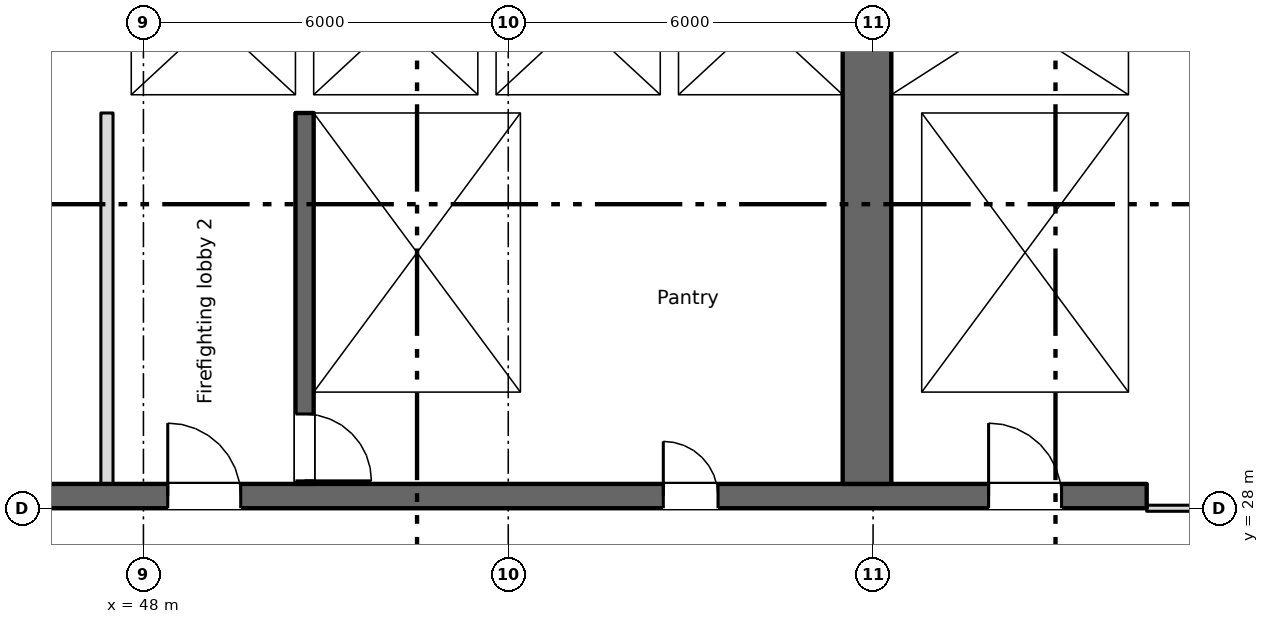
"""IFC4 building model, lengths in metres.
Left out: names, types, materials, properties, quantities, classifications, styles, units other than length and angle.
Written with IfcOpenShell. Run it as: python <this file> out.ifc"""

import sys

from ifc_helpers import new_model, si_unit, direction, frame, frame_2d, origin, place, context, subcontext, project, spatial, rectangle, extrude, element, fill, save


model = new_model("IFC4")
c1 = context("Model", 3, precision=1e-05, world=origin(), true_north=direction((0.0, 1.0)))
c2 = subcontext(c1, "Body", "Model", "MODEL_VIEW")
j1 = project(units=[si_unit("LENGTHUNIT", "METRE"), si_unit("PLANEANGLEUNIT", "RADIAN")], contexts=[c1])
p1 = place(None, origin())
s1 = spatial("IfcSite", under=j1, at=p1, CompositionType="ELEMENT")
p2 = place(p1, origin())
s2 = spatial("IfcBuilding", under=s1, at=p2, CompositionType="ELEMENT")
p3 = place(p2, frame((0.0, 0.0, 110.0)))
s3 = spatial("IfcBuildingStorey", under=s2, at=p3, CompositionType="ELEMENT", Elevation=110.0)
p4 = place(p3, frame((6.7, 28.2, 0.0), z_axis=(0.0, 0.0, 1.0), x_axis=(1.0, 0.0, 0.0)))
e1 = element("IfcWall", 1, at=p4, inside=s3, PredefinedType="SHEAR", context=c2, shape_type="SweptSolid", body=[
    extrude(rectangle(XDim=57.8, YDim=0.4, at=frame_2d((28.9, 0.0))), origin(), (0.0, 0.0, 1.0), 3.35),
])
p5 = place(p4, frame((12.562, 0.0, 0.0)))
e2 = element("IfcOpeningElement", 2, at=p5, cuts=e1, PredefinedType="OPENING", context=c2, shape_type="SweptSolid", body=[
    extrude(rectangle(XDim=0.9, YDim=2.1, at=frame_2d((0.45, 1.05))), frame((0.0, 0.21, 0.0), z_axis=(0.0, -1.0, 0.0), x_axis=(1.0, 0.0, 0.0)), (0.0, 0.0, 1.0), 0.42),
])
p6 = place(p4, frame((15.137, 0.0, 0.0)))
e3 = element("IfcOpeningElement", 3, at=p6, cuts=e1, PredefinedType="OPENING", context=c2, shape_type="SweptSolid", body=[
    extrude(rectangle(XDim=0.9, YDim=2.1, at=frame_2d((0.45, 1.05))), frame((0.0, 0.21, 0.0), z_axis=(0.0, -1.0, 0.0), x_axis=(1.0, 0.0, 0.0)), (0.0, 0.0, 1.0), 0.42),
])
p7 = place(p4, frame((49.85, 0.0, 0.0)))
e4 = element("IfcOpeningElement", 4, at=p7, cuts=e1, PredefinedType="OPENING", context=c2, shape_type="SweptSolid", body=[
    extrude(rectangle(XDim=0.9, YDim=2.1, at=frame_2d((0.45, 1.05))), frame((0.0, 0.21, 0.0), z_axis=(0.0, -1.0, 0.0), x_axis=(1.0, 0.0, 0.0)), (0.0, 0.0, 1.0), 0.42),
])
p8 = place(p4, frame((0.562, 0.0, 0.0)))
e5 = element("IfcOpeningElement", 5, at=p8, cuts=e1, PredefinedType="OPENING", context=c2, shape_type="SweptSolid", body=[
    extrude(rectangle(XDim=0.9, YDim=2.1, at=frame_2d((0.45, 1.05))), frame((0.0, 0.21, 0.0), z_axis=(0.0, -1.0, 0.0), x_axis=(1.0, 0.0, 0.0)), (0.0, 0.0, 1.0), 0.42),
])
p9 = place(p4, frame((2.137, 0.0, 0.0)))
e6 = element("IfcOpeningElement", 6, at=p9, cuts=e1, PredefinedType="OPENING", context=c2, shape_type="SweptSolid", body=[
    extrude(rectangle(XDim=0.9, YDim=2.1, at=frame_2d((0.45, 1.05))), frame((0.0, 0.21, 0.0), z_axis=(0.0, -1.0, 0.0), x_axis=(1.0, 0.0, 0.0)), (0.0, 0.0, 1.0), 0.42),
])
p10 = place(p4, frame((4.7, 0.0, 0.0)))
e7 = element("IfcOpeningElement", 7, at=p10, cuts=e1, PredefinedType="OPENING", context=c2, shape_type="SweptSolid", body=[
    extrude(rectangle(XDim=1.2, YDim=2.1, at=frame_2d((0.6, 1.05))), frame((0.0, 0.21, 0.0), z_axis=(0.0, -1.0, 0.0), x_axis=(1.0, 0.0, 0.0)), (0.0, 0.0, 1.0), 0.42),
])
p11 = place(p4, frame((31.7, 0.0, 0.0)))
e8 = element("IfcOpeningElement", 8, at=p11, cuts=e1, PredefinedType="OPENING", context=c2, shape_type="SweptSolid", body=[
    extrude(rectangle(XDim=1.2, YDim=2.1, at=frame_2d((0.6, 1.05))), frame((0.0, 0.21, 0.0), z_axis=(0.0, -1.0, 0.0), x_axis=(1.0, 0.0, 0.0)), (0.0, 0.0, 1.0), 0.42),
])
p12 = place(p4, frame((55.2, 0.0, 0.0)))
e9 = element("IfcOpeningElement", 9, at=p12, cuts=e1, PredefinedType="OPENING", context=c2, shape_type="SweptSolid", body=[
    extrude(rectangle(XDim=1.2, YDim=2.1, at=frame_2d((0.6, 1.05))), frame((0.0, 0.21, 0.0), z_axis=(0.0, -1.0, 0.0), x_axis=(1.0, 0.0, 0.0)), (0.0, 0.0, 1.0), 0.42),
])
p13 = place(p4, frame((21.7, 0.0, 0.0)))
e10 = element("IfcOpeningElement", 10, at=p13, cuts=e1, PredefinedType="OPENING", context=c2, shape_type="SweptSolid", body=[
    extrude(rectangle(XDim=1.2, YDim=2.1, at=frame_2d((0.6, 1.05))), frame((0.0, 0.21, 0.0), z_axis=(0.0, -1.0, 0.0), x_axis=(1.0, 0.0, 0.0)), (0.0, 0.0, 1.0), 0.42),
])
p14 = place(p4, frame((41.7, 0.0, 0.0)))
e11 = element("IfcOpeningElement", 11, at=p14, cuts=e1, PredefinedType="OPENING", context=c2, shape_type="SweptSolid", body=[
    extrude(rectangle(XDim=1.2, YDim=2.1, at=frame_2d((0.6, 1.05))), frame((0.0, 0.21, 0.0), z_axis=(0.0, -1.0, 0.0), x_axis=(1.0, 0.0, 0.0)), (0.0, 0.0, 1.0), 0.42),
])
p15 = place(p4, frame((24.85, 0.0, 0.0)))
e12 = element("IfcOpeningElement", 12, at=p15, cuts=e1, PredefinedType="OPENING", context=c2, shape_type="SweptSolid", body=[
    extrude(rectangle(XDim=2.4, YDim=2.1, at=frame_2d((1.2, 1.05))), frame((0.0, 0.21, 0.0), z_axis=(0.0, -1.0, 0.0), x_axis=(1.0, 0.0, 0.0)), (0.0, 0.0, 1.0), 0.42),
])
p16 = place(p4, frame((37.35, 0.0, 0.0)))
e13 = element("IfcOpeningElement", 13, at=p16, cuts=e1, PredefinedType="OPENING", context=c2, shape_type="SweptSolid", body=[
    extrude(rectangle(XDim=2.4, YDim=2.1, at=frame_2d((1.2, 1.05))), frame((0.0, 0.21, 0.0), z_axis=(0.0, -1.0, 0.0), x_axis=(1.0, 0.0, 0.0)), (0.0, 0.0, 1.0), 0.42),
])
p17 = place(p4, frame((7.95, 0.0, 0.0)))
e14 = element("IfcOpeningElement", 14, at=p17, cuts=e1, PredefinedType="OPENING", context=c2, shape_type="SweptSolid", body=[
    extrude(rectangle(XDim=2.4, YDim=2.1, at=frame_2d((1.2, 1.05))), frame((0.0, 0.21, 0.0), z_axis=(0.0, -1.0, 0.0), x_axis=(1.0, 0.0, 0.0)), (0.0, 0.0, 1.0), 0.42),
])
p18 = place(p4, frame((28.85, 0.0, 0.0)))
e15 = element("IfcOpeningElement", 15, at=p18, cuts=e1, PredefinedType="OPENING", context=c2, shape_type="SweptSolid", body=[
    extrude(rectangle(XDim=0.9, YDim=2.1, at=frame_2d((0.45, 1.05))), frame((0.0, 0.21, 0.0), z_axis=(0.0, -1.0, 0.0), x_axis=(1.0, 0.0, 0.0)), (0.0, 0.0, 1.0), 0.42),
])
p19 = place(p4, frame((34.85, 0.0, 0.0)))
e16 = element("IfcOpeningElement", 16, at=p19, cuts=e1, PredefinedType="OPENING", context=c2, shape_type="SweptSolid", body=[
    extrude(rectangle(XDim=0.9, YDim=2.1, at=frame_2d((0.45, 1.05))), frame((0.0, 0.21, 0.0), z_axis=(0.0, -1.0, 0.0), x_axis=(1.0, 0.0, 0.0)), (0.0, 0.0, 1.0), 0.42),
])
p20 = place(p3, frame((64.35, 34.8, 0.0), z_axis=(0.0, 0.0, 1.0), x_axis=(0.0, 1.0, 0.0)))
e17 = element("IfcWall", 17, at=p20, inside=s3, PredefinedType="SHEAR", context=c2, shape_type="SweptSolid", body=[
    extrude(rectangle(XDim=10.4, YDim=0.3, at=frame_2d((5.2, 0.0))), origin(), (0.0, 0.0, 1.0), 3.35),
])
p21 = place(p3, frame((59.9, 28.4, 0.0), z_axis=(0.0, 0.0, 1.0), x_axis=(0.0, 1.0, 0.0)))
e18 = element("IfcWall", 18, at=p21, inside=s3, PredefinedType="SHEAR", context=c2, shape_type="SweptSolid", body=[
    extrude(rectangle(XDim=16.8, YDim=0.8, at=frame_2d((8.4, 0.0))), origin(), (0.0, 0.0, 1.0), 3.35),
])
p22 = place(p21, frame((9.6, 0.0, 0.0)))
e19 = element("IfcOpeningElement", 19, at=p22, cuts=e18, PredefinedType="OPENING", context=c2, shape_type="SweptSolid", body=[
    extrude(rectangle(XDim=2.0, YDim=2.1, at=frame_2d((1.0, 1.05))), frame((0.0, 0.41, 0.0), z_axis=(0.0, -1.0, 0.0), x_axis=(1.0, 0.0, 0.0)), (0.0, 0.0, 1.0), 0.82),
])
p23 = place(p21, frame((15.35, 0.0, 0.0)))
e20 = element("IfcOpeningElement", 20, at=p23, cuts=e18, PredefinedType="OPENING", context=c2, shape_type="SweptSolid", body=[
    extrude(rectangle(XDim=1.2, YDim=2.1, at=frame_2d((0.6, 1.05))), frame((0.0, 0.41, 0.0), z_axis=(0.0, -1.0, 0.0), x_axis=(1.0, 0.0, 0.0)), (0.0, 0.0, 1.0), 0.82),
])
p24 = place(p3, frame((50.65, 34.5, 0.0), z_axis=(0.0, 0.0, 1.0), x_axis=(0.0, -1.0, 0.0)))
e21 = element("IfcWall", 21, at=p24, inside=s3, PredefinedType="SHEAR", context=c2, shape_type="SweptSolid", body=[
    extrude(rectangle(XDim=6.1, YDim=0.3, at=frame_2d((3.05, 0.0))), origin(), (0.0, 0.0, 1.0), 3.35),
])
p25 = place(p24, frame((4.95, 0.0, 0.0)))
e22 = element("IfcOpeningElement", 22, at=p25, cuts=e21, PredefinedType="OPENING", context=c2, shape_type="SweptSolid", body=[
    extrude(rectangle(XDim=1.1, YDim=2.1, at=frame_2d((0.55, 1.05))), frame((0.0, 0.16, 0.0), z_axis=(0.0, -1.0, 0.0), x_axis=(1.0, 0.0, 0.0)), (0.0, 0.0, 1.0), 0.32),
])
p26 = place(p3, frame((54.35, 28.4, 0.0), z_axis=(0.0, 0.0, 1.0), x_axis=(0.0, 1.0, 0.0)))
e23 = element("IfcWall", 23, at=p26, inside=s3, PredefinedType="SHEAR", context=c2, shape_type="SweptSolid", body=[
    extrude(rectangle(XDim=6.1, YDim=0.3, at=frame_2d((3.05, 0.0))), origin(), (0.0, 0.0, 1.0), 3.35),
])
p27 = place(p3, frame((60.55, 28.4, 0.0), z_axis=(0.0, 0.0, 1.0), x_axis=(0.0, 1.0, 0.0)))
e24 = element("IfcWall", 24, at=p27, inside=s3, PredefinedType="SHEAR", context=c2, shape_type="SweptSolid", body=[
    extrude(rectangle(XDim=6.1, YDim=0.5, at=frame_2d((3.05, 0.0))), origin(), (0.0, 0.0, 1.0), 3.35),
])
p28 = place(p3, frame((64.35, 28.4, 0.0), z_axis=(0.0, 0.0, 1.0), x_axis=(0.0, 1.0, 0.0)))
e25 = element("IfcWall", 25, at=p28, inside=s3, PredefinedType="SHEAR", context=c2, shape_type="SweptSolid", body=[
    extrude(rectangle(XDim=6.1, YDim=0.3, at=frame_2d((3.05, 0.0))), origin(), (0.0, 0.0, 1.0), 3.35),
])
p29 = place(p3, frame((47.3, 34.65, 0.0), z_axis=(0.0, 0.0, 1.0), x_axis=(1.0, 0.0, 0.0)))
e26 = element("IfcWall", 26, at=p29, inside=s3, PredefinedType="SHEAR", context=c2, shape_type="SweptSolid", body=[
    extrude(rectangle(XDim=12.2, YDim=0.3, at=frame_2d((6.1, 0.0))), origin(), (0.0, 0.0, 1.0), 3.35),
])
p30 = place(p29, frame((1.3, 0.0, 0.0)))
e27 = element("IfcOpeningElement", 27, at=p30, cuts=e26, PredefinedType="OPENING", context=c2, shape_type="SweptSolid", body=[
    extrude(rectangle(XDim=1.1, YDim=2.1, at=frame_2d((0.55, 1.05))), frame((0.0, 0.16, 0.0), z_axis=(0.0, -1.0, 0.0), x_axis=(1.0, 0.0, 0.0)), (0.0, 0.0, 1.0), 0.32),
])
p31 = place(p3, frame((60.3, 34.65, 0.0), z_axis=(0.0, 0.0, 1.0), x_axis=(1.0, 0.0, 0.0)))
e28 = element("IfcWall", 28, at=p31, inside=s3, PredefinedType="SHEAR", context=c2, shape_type="SweptSolid", body=[
    extrude(rectangle(XDim=4.2, YDim=0.3, at=frame_2d((2.1, 0.0))), origin(), (0.0, 0.0, 1.0), 3.35),
])
p32 = place(p3, frame((47.55, 34.8, 0.0), z_axis=(0.0, 0.0, 1.0), x_axis=(0.0, 1.0, 0.0)))
e29 = element("IfcWall", 29, at=p32, inside=s3, PredefinedType="SHEAR", context=c2, shape_type="SweptSolid", body=[
    extrude(rectangle(XDim=2.5, YDim=0.5, at=frame_2d((1.25, 0.0))), origin(), (0.0, 0.0, 1.0), 3.35),
])
for number, where, z_axis, x_axis in (
    (30, (50.65, 34.8, 0.0), (0.0, 0.0, 1.0), (0.0, 1.0, 0.0)),
    (31, (53.65, 34.8, 0.0), (0.0, 0.0, 1.0), (0.0, 1.0, 0.0)),
    (32, (56.65, 34.8, 0.0), (0.0, 0.0, 1.0), (0.0, 1.0, 0.0)),
):
    element("IfcWall", number, at=place(p3, frame(where, z_axis=z_axis, x_axis=x_axis)), inside=s3, PredefinedType="SHEAR", context=c2, shape_type="SweptSolid", body=[
        extrude(rectangle(XDim=2.5, YDim=0.3, at=frame_2d((1.25, 0.0))), origin(), (0.0, 0.0, 1.0), 3.35),
    ])
p33 = place(p3, frame((47.4, 28.4, 0.0), z_axis=(0.0, 0.0, 1.0), x_axis=(0.0, 1.0, 0.0)))
e33 = element("IfcWall", 33, at=p33, inside=s3, PredefinedType="PARTITIONING", context=c2, shape_type="SweptSolid", body=[
    extrude(rectangle(XDim=6.1, YDim=0.2, at=frame_2d((3.05, 0.0))), origin(), (0.0, 0.0, 1.0), 3.35),
])
p34 = place(p3, frame((64.5, 28.0, 0.0), z_axis=(0.0, 0.0, 1.0), x_axis=(1.0, 0.0, 0.0)))
e34 = element("IfcWall", 34, at=p34, inside=s3, PredefinedType="PARTITIONING", context=c2, shape_type="SweptSolid", body=[
    extrude(rectangle(XDim=6.8, YDim=0.1, at=frame_2d((3.4, 0.0))), origin(), (0.0, 0.0, 1.0), 3.35),
])
p35 = place(p34, frame((2.5, 0.0, 0.0)))
e35 = element("IfcOpeningElement", 35, at=p35, cuts=e34, PredefinedType="OPENING", context=c2, shape_type="SweptSolid", body=[
    extrude(rectangle(XDim=1.8, YDim=2.1, at=frame_2d((0.9, 1.05))), frame((0.0, 0.06, 0.0), z_axis=(0.0, -1.0, 0.0), x_axis=(1.0, 0.0, 0.0)), (0.0, 0.0, 1.0), 0.12),
])
p36 = place(p7, origin())
e36 = element("IfcDoor", 36, at=p36, inside=s3, OperationType="SINGLE_SWING_LEFT", PredefinedType="DOOR", context=c2, shape_type="SweptSolid", body=[
    extrude(rectangle(XDim=0.9, YDim=2.1, at=frame_2d((0.45, 1.05))), frame((0.0, 0.025, 0.0), z_axis=(0.0, -1.0, 0.0), x_axis=(1.0, 0.0, 0.0)), (0.0, 0.0, 1.0), 0.05),
])
fill(e4, e36)
p37 = place(p30, origin())
e37 = element("IfcDoor", 37, at=p37, inside=s3, OperationType="SLIDING_TO_LEFT", PredefinedType="DOOR", context=c2, shape_type="SweptSolid", body=[
    extrude(rectangle(XDim=1.1, YDim=2.1, at=frame_2d((0.55, 1.05))), frame((0.0, 0.025, 0.0), z_axis=(0.0, -1.0, 0.0), x_axis=(1.0, 0.0, 0.0)), (0.0, 0.0, 1.0), 0.05),
])
fill(e27, e37)
p38 = place(p25, origin())
e38 = element("IfcDoor", 38, at=p38, inside=s3, OperationType="SINGLE_SWING_RIGHT", PredefinedType="DOOR", context=c2, shape_type="SweptSolid", body=[
    extrude(rectangle(XDim=1.1, YDim=2.1, at=frame_2d((0.55, 1.05))), frame((0.0, 0.025, 0.0), z_axis=(0.0, -1.0, 0.0), x_axis=(1.0, 0.0, 0.0)), (0.0, 0.0, 1.0), 0.05),
])
fill(e22, e38)
p39 = place(p12, origin())
e39 = element("IfcDoor", 39, at=p39, inside=s3, OperationType="SINGLE_SWING_LEFT", PredefinedType="DOOR", context=c2, shape_type="SweptSolid", body=[
    extrude(rectangle(XDim=1.2, YDim=2.1, at=frame_2d((0.6, 1.05))), frame((0.0, 0.025, 0.0), z_axis=(0.0, -1.0, 0.0), x_axis=(1.0, 0.0, 0.0)), (0.0, 0.0, 1.0), 0.05),
])
fill(e9, e39)
p40 = place(p14, origin())
e40 = element("IfcDoor", 40, at=p40, inside=s3, OperationType="SINGLE_SWING_LEFT", PredefinedType="DOOR", context=c2, shape_type="SweptSolid", body=[
    extrude(rectangle(XDim=1.2, YDim=2.1, at=frame_2d((0.6, 1.05))), frame((0.0, 0.025, 0.0), z_axis=(0.0, -1.0, 0.0), x_axis=(1.0, 0.0, 0.0)), (0.0, 0.0, 1.0), 0.05),
])
fill(e11, e40)
save(model, sys.argv[1])
